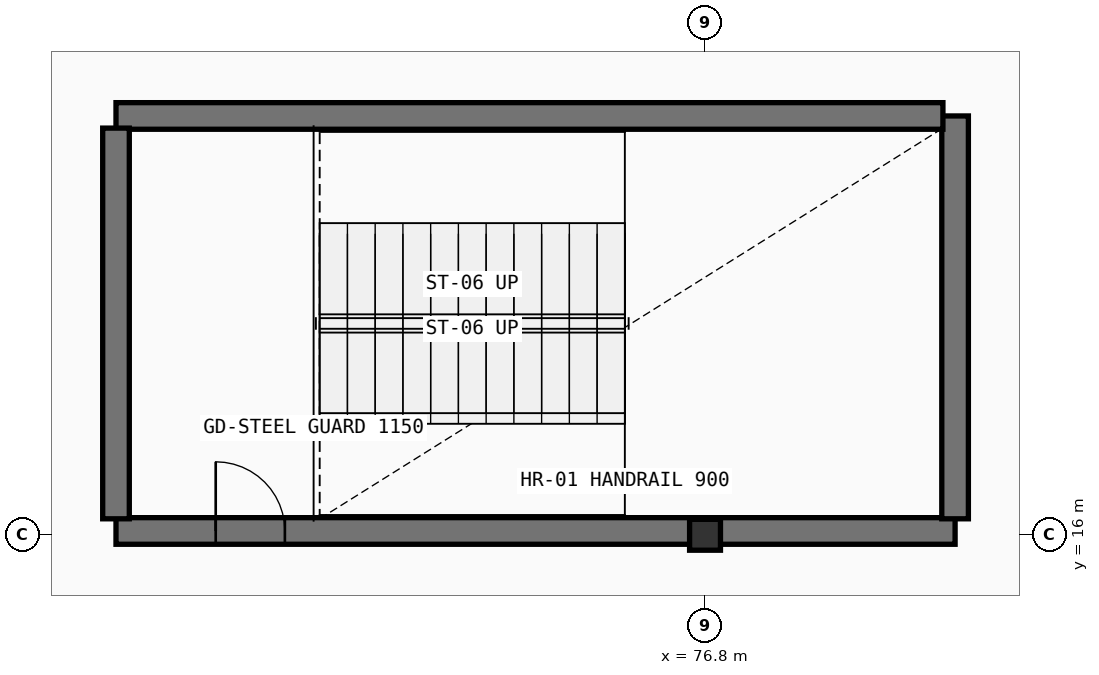
"""IFC4 building model, lengths in metres.
Left out: names, types, materials, properties, quantities, classifications, styles, units other than length and angle.
Written with IfcOpenShell. Run it as: python <this file> out.ifc"""

import sys

from ifc_helpers import new_model, si_unit, direction, frame, frame_2d, origin, origin_2d, place, context, subcontext, project, spatial, rectangle, hollow_circle, extrude, element, fill, save


model = new_model("IFC4")
c1 = context("Model", 3, precision=1e-05, world=origin(), true_north=direction((0.0, 1.0)))
c2 = subcontext(c1, "Body", "Model", "MODEL_VIEW")
j1 = project(units=[si_unit("LENGTHUNIT", "METRE"), si_unit("PLANEANGLEUNIT", "RADIAN")], contexts=[c1])
p1 = place(None, origin())
s1 = spatial("IfcSite", under=j1, at=p1, CompositionType="ELEMENT")
p2 = place(p1, origin())
s2 = spatial("IfcBuilding", under=s1, at=p2, CompositionType="ELEMENT")
p3 = place(p2, frame((0.0, 0.0, 15.9)))
s3 = spatial("IfcBuildingStorey", under=s2, at=p3, CompositionType="ELEMENT", Elevation=15.9)
p4 = place(p3, frame((76.8, 16.0, 0.0), z_axis=(0.0, 0.0, 1.0), x_axis=(1.0, 0.0, 0.0)))
e1 = element("IfcColumn", 1, at=p4, inside=s3, PredefinedType="COLUMN", context=c2, shape_type="SweptSolid", body=[
    extrude(hollow_circle(Radius=0.203, WallThickness=0.02, at=origin_2d()), origin(), (0.0, 0.0, 1.0), 4.5),
])
p5 = place(p3, frame((69.05, 16.05, 0.0), z_axis=(0.0, 0.0, 1.0), x_axis=(1.0, 0.0, 0.0)))
e2 = element("IfcWall", 2, at=p5, inside=s3, PredefinedType="SHEAR", context=c2, shape_type="SweptSolid", body=[
    extrude(rectangle(XDim=11.04, YDim=0.35, at=frame_2d((5.52, 0.0))), origin(), (0.0, 0.0, 1.0), 4.276),
])
p6 = place(p5, frame((1.312, 0.0, 0.0)))
e3 = element("IfcOpeningElement", 3, at=p6, cuts=e2, PredefinedType="OPENING", context=c2, shape_type="SweptSolid", body=[
    extrude(rectangle(XDim=0.91, YDim=2.08, at=frame_2d((0.455, 1.04))), frame((0.0, 0.185, 0.0), z_axis=(0.0, -1.0, 0.0), x_axis=(1.0, 0.0, 0.0)), (0.0, 0.0, 1.0), 0.37),
])
p7 = place(p3, frame((80.09, 16.21, 0.0), z_axis=(0.0, 0.0, 1.0), x_axis=(0.0, 1.0, 0.0)))
e4 = element("IfcWall", 4, at=p7, inside=s3, PredefinedType="SHEAR", context=c2, shape_type="SweptSolid", body=[
    extrude(rectangle(XDim=5.3, YDim=0.35, at=frame_2d((2.65, 0.0))), origin(), (0.0, 0.0, 1.0), 4.276),
])
p8 = place(p3, frame((79.93, 21.51, 0.0), z_axis=(0.0, 0.0, 1.0), x_axis=(-1.0, 0.0, 0.0)))
e5 = element("IfcWall", 5, at=p8, inside=s3, PredefinedType="SHEAR", context=c2, shape_type="SweptSolid", body=[
    extrude(rectangle(XDim=10.88, YDim=0.35, at=frame_2d((5.44, 0.0))), origin(), (0.0, 0.0, 1.0), 4.276),
])
p9 = place(p3, frame((69.05, 21.35, 0.0), z_axis=(0.0, 0.0, 1.0), x_axis=(0.0, -1.0, 0.0)))
e6 = element("IfcWall", 6, at=p9, inside=s3, PredefinedType="SHEAR", context=c2, shape_type="SweptSolid", body=[
    extrude(rectangle(XDim=5.14, YDim=0.35, at=frame_2d((2.57, 0.0))), origin(), (0.0, 0.0, 1.0), 4.276),
])
p10 = place(p6, origin())
e7 = element("IfcDoor", 7, at=p10, inside=s3, OperationType="SINGLE_SWING_RIGHT", PredefinedType="DOOR", context=c2, shape_type="SweptSolid", body=[
    extrude(rectangle(XDim=0.91, YDim=2.08, at=frame_2d((0.455, 1.04))), frame((0.0, 0.025, 0.0), z_axis=(0.0, -1.0, 0.0), x_axis=(1.0, 0.0, 0.0)), (0.0, 0.0, 1.0), 0.05),
])
fill(e3, e7)
save(model, sys.argv[1])
